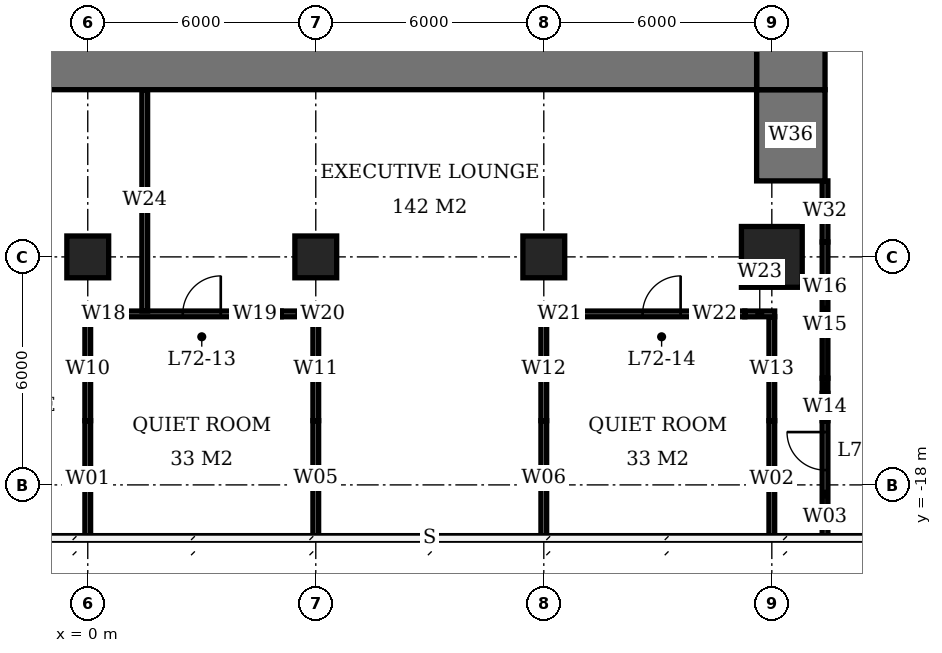
"""IFC4 building model, lengths in metres.
Left out: names, types, materials, properties, quantities, classifications, styles, units other than length and angle.
Written with IfcOpenShell. Run it as: python <this file> out.ifc"""

import sys

from ifc_helpers import new_model, si_unit, direction, frame, frame_2d, origin, origin_2d, place, context, subcontext, project, spatial, rectangle, extrude, element, fill, save


model = new_model("IFC4")
c1 = context("Model", 3, precision=1e-05, world=origin(), true_north=direction((0.0, 1.0)))
c2 = subcontext(c1, "Body", "Model", "MODEL_VIEW")
j1 = project(units=[si_unit("LENGTHUNIT", "METRE"), si_unit("PLANEANGLEUNIT", "RADIAN")], contexts=[c1])
p1 = place(None, origin())
s1 = spatial("IfcSite", under=j1, at=p1, CompositionType="ELEMENT")
p2 = place(p1, origin())
s2 = spatial("IfcBuilding", under=s1, at=p2, CompositionType="ELEMENT")
p3 = place(p2, frame((0.0, 0.0, 291.8)))
s3 = spatial("IfcBuildingStorey", under=s2, at=p3, CompositionType="ELEMENT", Elevation=291.8)
for number, where, z_axis, x_axis in (
    (1, (0.0, -12.0, 0.0), (0.0, 0.0, 1.0), (1.0, 0.0, 0.0)),
    (2, (6.0, -12.0, 0.0), (0.0, 0.0, 1.0), (1.0, 0.0, 0.0)),
    (3, (12.0, -12.0, 0.0), (0.0, 0.0, 1.0), (1.0, 0.0, 0.0)),
):
    element("IfcColumn", number, at=place(p3, frame(where, z_axis=z_axis, x_axis=x_axis)), inside=s3, PredefinedType="COLUMN", context=c2, shape_type="SweptSolid", body=[
        extrude(rectangle(XDim=1.1, YDim=1.1, at=origin_2d()), origin(), (0.0, 0.0, 1.0), 3.9),
    ])
p4 = place(p3, frame((18.0, -12.0, 0.0), z_axis=(0.0, 0.0, 1.0), x_axis=(1.0, 0.0, 0.0)))
e4 = element("IfcColumn", 4, at=p4, inside=s3, PredefinedType="COLUMN", context=c2, shape_type="SweptSolid", body=[
    extrude(rectangle(XDim=1.6, YDim=1.6, at=origin_2d()), origin(), (0.0, 0.0, 1.0), 3.9),
])
p5 = place(p3, frame((-5.6, -6.6, 0.0), z_axis=(0.0, 0.0, 1.0), x_axis=(1.0, 0.0, 0.0)))
e5 = element("IfcWall", 5, at=p5, inside=s3, PredefinedType="SHEAR", context=c2, shape_type="SweptSolid", body=[
    extrude(rectangle(XDim=23.2, YDim=2.0, at=frame_2d((11.6, 0.0))), origin(), (0.0, 0.0, 1.0), 3.9),
])
p6 = place(p3, frame((18.5, -7.6, 0.0), z_axis=(0.0, 0.0, 1.0), x_axis=(0.0, 1.0, 0.0)))
e6 = element("IfcWall", 6, at=p6, inside=s3, PredefinedType="SHEAR", context=c2, shape_type="SweptSolid", body=[
    extrude(rectangle(XDim=21.2, YDim=1.8, at=frame_2d((10.6, 0.0))), origin(), (0.0, 0.0, 1.0), 3.9),
])
p7 = place(p6, frame((9.2, 0.0, 0.0)))
e7 = element("IfcOpeningElement", 7, at=p7, cuts=e6, PredefinedType="OPENING", context=c2, shape_type="SweptSolid", body=[
    extrude(rectangle(XDim=1.8, YDim=2.4, at=frame_2d((0.9, 1.2))), frame((0.0, 0.91, 0.0), z_axis=(0.0, -1.0, 0.0), x_axis=(1.0, 0.0, 0.0)), (0.0, 0.0, 1.0), 1.82),
])
p8 = place(p3, frame((18.5, -10.0, 0.0), z_axis=(0.0, 0.0, 1.0), x_axis=(0.0, 1.0, 0.0)))
e8 = element("IfcWall", 8, at=p8, inside=s3, PredefinedType="SHEAR", context=c2, shape_type="SweptSolid", body=[
    extrude(rectangle(XDim=2.4, YDim=1.8, at=frame_2d((1.2, 0.0))), origin(), (0.0, 0.0, 1.0), 3.9),
])
p9 = place(p3, frame((-0.075, -13.5, 0.0), z_axis=(0.0, 0.0, 1.0), x_axis=(1.0, 0.0, 0.0)))
e9 = element("IfcWall", 9, at=p9, inside=s3, PredefinedType="PARTITIONING", context=c2, shape_type="SweptSolid", body=[
    extrude(rectangle(XDim=0.985, YDim=0.15, at=frame_2d((0.492, 0.0))), origin(), (0.0, 0.0, 1.0), 2.65),
])
p10 = place(p3, frame((0.91, -13.5, 0.0), z_axis=(0.0, 0.0, 1.0), x_axis=(1.0, 0.0, 0.0)))
e10 = element("IfcWall", 10, at=p10, inside=s3, PredefinedType="PARTITIONING", context=c2, shape_type="SweptSolid", body=[
    extrude(rectangle(XDim=4.18, YDim=0.15, at=frame_2d((2.09, 0.0))), origin(), (0.0, 0.0, 1.0), 3.65),
])
p11 = place(p10, frame((1.59, 0.0, 0.0)))
e11 = element("IfcOpeningElement", 11, at=p11, cuts=e10, PredefinedType="OPENING", context=c2, shape_type="SweptSolid", body=[
    extrude(rectangle(XDim=1.0, YDim=2.4, at=frame_2d((0.5, 1.2))), frame((0.0, 0.085, 0.0), z_axis=(0.0, -1.0, 0.0), x_axis=(1.0, 0.0, 0.0)), (0.0, 0.0, 1.0), 0.17),
])
for number, where, z_axis, x_axis in (
    (12, (5.09, -13.5, 0.0), (0.0, 0.0, 1.0), (1.0, 0.0, 0.0)),
    (13, (11.925, -13.5, 0.0), (0.0, 0.0, 1.0), (1.0, 0.0, 0.0)),
):
    element("IfcWall", number, at=place(p3, frame(where, z_axis=z_axis, x_axis=x_axis)), inside=s3, PredefinedType="PARTITIONING", context=c2, shape_type="SweptSolid", body=[
        extrude(rectangle(XDim=0.985, YDim=0.15, at=frame_2d((0.492, 0.0))), origin(), (0.0, 0.0, 1.0), 2.65),
    ])
p12 = place(p3, frame((12.91, -13.5, 0.0), z_axis=(0.0, 0.0, 1.0), x_axis=(1.0, 0.0, 0.0)))
e14 = element("IfcWall", 14, at=p12, inside=s3, PredefinedType="PARTITIONING", context=c2, shape_type="SweptSolid", body=[
    extrude(rectangle(XDim=4.38, YDim=0.15, at=frame_2d((2.19, 0.0))), origin(), (0.0, 0.0, 1.0), 3.65),
])
p13 = place(p12, frame((1.69, 0.0, 0.0)))
e15 = element("IfcOpeningElement", 15, at=p13, cuts=e14, PredefinedType="OPENING", context=c2, shape_type="SweptSolid", body=[
    extrude(rectangle(XDim=1.0, YDim=2.4, at=frame_2d((0.5, 1.2))), frame((0.0, 0.085, 0.0), z_axis=(0.0, -1.0, 0.0), x_axis=(1.0, 0.0, 0.0)), (0.0, 0.0, 1.0), 0.17),
])
p14 = place(p3, frame((17.29, -13.5, 0.0), z_axis=(0.0, 0.0, 1.0), x_axis=(1.0, 0.0, 0.0)))
e16 = element("IfcWall", 16, at=p14, inside=s3, PredefinedType="PARTITIONING", context=c2, shape_type="SweptSolid", body=[
    extrude(rectangle(XDim=0.785, YDim=0.15, at=frame_2d((0.393, 0.0))), origin(), (0.0, 0.0, 1.0), 2.65),
])
p15 = place(p3, frame((0.0, -19.375, 0.0), z_axis=(0.0, 0.0, 1.0), x_axis=(0.0, 1.0, 0.0)))
e17 = element("IfcWall", 17, at=p15, inside=s3, PredefinedType="PARTITIONING", context=c2, shape_type="SweptSolid", body=[
    extrude(rectangle(XDim=3.065, YDim=0.15, at=frame_2d((1.532, 0.0))), origin(), (0.0, 0.0, 1.0), 3.65),
])
p16 = place(p3, frame((0.0, -16.31, 0.0), z_axis=(0.0, 0.0, 1.0), x_axis=(0.0, 1.0, 0.0)))
e18 = element("IfcWall", 18, at=p16, inside=s3, PredefinedType="PARTITIONING", context=c2, shape_type="SweptSolid", body=[
    extrude(rectangle(XDim=2.735, YDim=0.15, at=frame_2d((1.368, 0.0))), origin(), (0.0, 0.0, 1.0), 2.65),
])
p17 = place(p3, frame((6.0, -19.35, 0.0), z_axis=(0.0, 0.0, 1.0), x_axis=(0.0, 1.0, 0.0)))
e19 = element("IfcWall", 19, at=p17, inside=s3, PredefinedType="PARTITIONING", context=c2, shape_type="SweptSolid", body=[
    extrude(rectangle(XDim=3.04, YDim=0.15, at=frame_2d((1.52, 0.0))), origin(), (0.0, 0.0, 1.0), 3.65),
])
p18 = place(p3, frame((6.0, -16.31, 0.0), z_axis=(0.0, 0.0, 1.0), x_axis=(0.0, 1.0, 0.0)))
e20 = element("IfcWall", 20, at=p18, inside=s3, PredefinedType="PARTITIONING", context=c2, shape_type="SweptSolid", body=[
    extrude(rectangle(XDim=2.735, YDim=0.15, at=frame_2d((1.368, 0.0))), origin(), (0.0, 0.0, 1.0), 2.65),
])
p19 = place(p3, frame((12.0, -19.35, 0.0), z_axis=(0.0, 0.0, 1.0), x_axis=(0.0, 1.0, 0.0)))
e21 = element("IfcWall", 21, at=p19, inside=s3, PredefinedType="PARTITIONING", context=c2, shape_type="SweptSolid", body=[
    extrude(rectangle(XDim=3.04, YDim=0.15, at=frame_2d((1.52, 0.0))), origin(), (0.0, 0.0, 1.0), 3.65),
])
p20 = place(p3, frame((12.0, -16.31, 0.0), z_axis=(0.0, 0.0, 1.0), x_axis=(0.0, 1.0, 0.0)))
e22 = element("IfcWall", 22, at=p20, inside=s3, PredefinedType="PARTITIONING", context=c2, shape_type="SweptSolid", body=[
    extrude(rectangle(XDim=2.735, YDim=0.15, at=frame_2d((1.368, 0.0))), origin(), (0.0, 0.0, 1.0), 2.65),
])
p21 = place(p3, frame((18.0, -19.375, 0.0), z_axis=(0.0, 0.0, 1.0), x_axis=(0.0, 1.0, 0.0)))
e23 = element("IfcWall", 23, at=p21, inside=s3, PredefinedType="PARTITIONING", context=c2, shape_type="SweptSolid", body=[
    extrude(rectangle(XDim=3.065, YDim=0.15, at=frame_2d((1.532, 0.0))), origin(), (0.0, 0.0, 1.0), 3.65),
])
p22 = place(p3, frame((18.0, -16.31, 0.0), z_axis=(0.0, 0.0, 1.0), x_axis=(0.0, 1.0, 0.0)))
e24 = element("IfcWall", 24, at=p22, inside=s3, PredefinedType="PARTITIONING", context=c2, shape_type="SweptSolid", body=[
    extrude(rectangle(XDim=2.735, YDim=0.15, at=frame_2d((1.368, 0.0))), origin(), (0.0, 0.0, 1.0), 2.65),
])
p23 = place(p3, frame((1.5, -13.425, 0.0), z_axis=(0.0, 0.0, 1.0), x_axis=(0.0, 1.0, 0.0)))
e25 = element("IfcWall", 25, at=p23, inside=s3, PredefinedType="PARTITIONING", context=c2, shape_type="SweptSolid", body=[
    extrude(rectangle(XDim=5.825, YDim=0.15, at=frame_2d((2.913, 0.0))), origin(), (0.0, 0.0, 1.0), 3.65),
])
p24 = place(p3, frame((19.4, -19.375, 0.0), z_axis=(0.0, 0.0, 1.0), x_axis=(0.0, 1.0, 0.0)))
e26 = element("IfcWall", 26, at=p24, inside=s3, PredefinedType="PARTITIONING", context=c2, shape_type="SweptSolid", body=[
    extrude(rectangle(XDim=3.065, YDim=0.15, at=frame_2d((1.532, 0.0))), origin(), (0.0, 0.0, 1.0), 3.65),
])
p25 = place(p24, frame((1.765, 0.0, 0.0)))
e27 = element("IfcOpeningElement", 27, at=p25, cuts=e26, PredefinedType="OPENING", context=c2, shape_type="SweptSolid", body=[
    extrude(rectangle(XDim=1.0, YDim=2.4, at=frame_2d((0.5, 1.2))), frame((0.0, 0.085, 0.0), z_axis=(0.0, -1.0, 0.0), x_axis=(1.0, 0.0, 0.0)), (0.0, 0.0, 1.0), 0.17),
])
p26 = place(p3, frame((19.4, -16.31, 0.0), z_axis=(0.0, 0.0, 1.0), x_axis=(0.0, 1.0, 0.0)))
e28 = element("IfcWall", 28, at=p26, inside=s3, PredefinedType="PARTITIONING", context=c2, shape_type="SweptSolid", body=[
    extrude(rectangle(XDim=0.72, YDim=0.15, at=frame_2d((0.36, 0.0))), origin(), (0.0, 0.0, 1.0), 2.65),
])
p27 = place(p3, frame((19.4, -15.59, 0.0), z_axis=(0.0, 0.0, 1.0), x_axis=(0.0, 1.0, 0.0)))
e29 = element("IfcWall", 29, at=p27, inside=s3, PredefinedType="PARTITIONING", context=c2, shape_type="SweptSolid", body=[
    extrude(rectangle(XDim=0.398, YDim=0.15, at=frame_2d((0.199, 0.0))), origin(), (0.0, 0.0, 1.0), 3.65),
])
p28 = place(p3, frame((19.4, -15.192, 0.0), z_axis=(0.0, 0.0, 1.0), x_axis=(0.0, 1.0, 0.0)))
e30 = element("IfcWall", 30, at=p28, inside=s3, PredefinedType="PARTITIONING", context=c2, shape_type="SweptSolid", body=[
    extrude(rectangle(XDim=3.584, YDim=0.15, at=frame_2d((1.792, 0.0))), origin(), (0.0, 0.0, 1.0), 2.65),
])
p29 = place(p3, frame((19.4, -11.608, 0.0), z_axis=(0.0, 0.0, 1.0), x_axis=(0.0, 1.0, 0.0)))
e31 = element("IfcWall", 31, at=p29, inside=s3, PredefinedType="PARTITIONING", context=c2, shape_type="SweptSolid", body=[
    extrude(rectangle(XDim=1.608, YDim=0.15, at=frame_2d((0.804, 0.0))), origin(), (0.0, 0.0, 1.0), 3.65),
])
p30 = place(p11, origin())
e32 = element("IfcDoor", 32, at=p30, inside=s3, OperationType="SINGLE_SWING_RIGHT", PredefinedType="DOOR", context=c2, shape_type="SweptSolid", body=[
    extrude(rectangle(XDim=1.0, YDim=2.4, at=frame_2d((0.5, 1.2))), frame((0.0, 0.025, 0.0), z_axis=(0.0, -1.0, 0.0), x_axis=(1.0, 0.0, 0.0)), (0.0, 0.0, 1.0), 0.05),
])
fill(e11, e32)
p31 = place(p13, origin())
e33 = element("IfcDoor", 33, at=p31, inside=s3, OperationType="SINGLE_SWING_RIGHT", PredefinedType="DOOR", context=c2, shape_type="SweptSolid", body=[
    extrude(rectangle(XDim=1.0, YDim=2.4, at=frame_2d((0.5, 1.2))), frame((0.0, 0.025, 0.0), z_axis=(0.0, -1.0, 0.0), x_axis=(1.0, 0.0, 0.0)), (0.0, 0.0, 1.0), 0.05),
])
fill(e15, e33)
p32 = place(p25, origin())
e34 = element("IfcDoor", 34, at=p32, inside=s3, OperationType="SINGLE_SWING_RIGHT", PredefinedType="DOOR", context=c2, shape_type="SweptSolid", body=[
    extrude(rectangle(XDim=1.0, YDim=2.4, at=frame_2d((0.5, 1.2))), frame((0.0, 0.025, 0.0), z_axis=(0.0, -1.0, 0.0), x_axis=(1.0, 0.0, 0.0)), (0.0, 0.0, 1.0), 0.05),
])
fill(e27, e34)
save(model, sys.argv[1])
